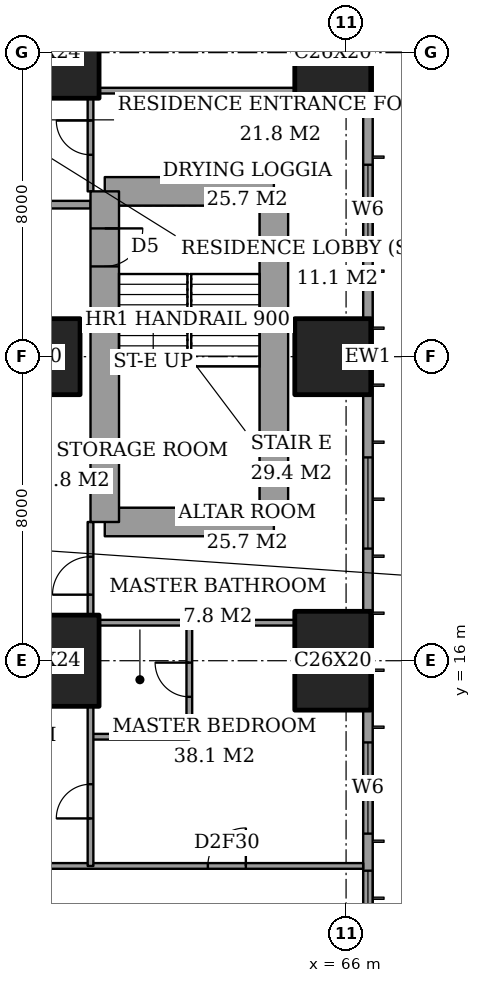
"""IFC4 building model, lengths in metres.
Left out: names, types, materials, properties, quantities, classifications, styles, units other than length and angle.
Written with IfcOpenShell. Run it as: python <this file> out.ifc"""

import sys

from ifc_helpers import new_model, si_unit, direction, frame, frame_2d, origin, origin_2d, place, context, subcontext, project, spatial, rectangle, extrude, element, fill, save


model = new_model("IFC4")
c1 = context("Model", 3, precision=1e-05, world=origin(), true_north=direction((0.0, 1.0)))
c2 = subcontext(c1, "Body", "Model", "MODEL_VIEW")
j1 = project(units=[si_unit("LENGTHUNIT", "METRE"), si_unit("PLANEANGLEUNIT", "RADIAN")], contexts=[c1])
p1 = place(None, origin())
s1 = spatial("IfcSite", under=j1, at=p1, CompositionType="ELEMENT")
p2 = place(p1, origin())
s2 = spatial("IfcBuilding", under=s1, at=p2, CompositionType="ELEMENT")
p3 = place(p2, frame((0.0, 0.0, 58.4)))
s3 = spatial("IfcBuildingStorey", under=s2, at=p3, CompositionType="ELEMENT", Elevation=58.4)
p4 = place(p3, frame((58.0, 16.0, 0.0), z_axis=(0.0, 0.0, 1.0), x_axis=(1.0, 0.0, 0.0)))
e1 = element("IfcColumn", 1, at=p4, inside=s3, PredefinedType="COLUMN", context=c2, shape_type="SweptSolid", body=[
    extrude(rectangle(XDim=3.0, YDim=2.4, at=origin_2d()), origin(), (0.0, 0.0, 1.0), 3.6),
])
p5 = place(p3, frame((58.0, 24.0, 0.0), z_axis=(0.0, 0.0, 1.0), x_axis=(1.0, 0.0, 0.0)))
e2 = element("IfcColumn", 2, at=p5, inside=s3, PredefinedType="COLUMN", context=c2, shape_type="SweptSolid", body=[
    extrude(rectangle(XDim=2.0, YDim=2.0, at=origin_2d()), origin(), (0.0, 0.0, 1.0), 3.6),
])
p6 = place(p3, frame((58.0, 32.0, 0.0), z_axis=(0.0, 0.0, 1.0), x_axis=(1.0, 0.0, 0.0)))
e3 = element("IfcColumn", 3, at=p6, inside=s3, PredefinedType="COLUMN", context=c2, shape_type="SweptSolid", body=[
    extrude(rectangle(XDim=3.0, YDim=2.4, at=origin_2d()), origin(), (0.0, 0.0, 1.0), 3.6),
])
p7 = place(p3, frame((65.65, 16.0, 0.0), z_axis=(0.0, 0.0, 1.0), x_axis=(0.0, 1.0, 0.0)))
e4 = element("IfcColumn", 4, at=p7, inside=s3, PredefinedType="COLUMN", context=c2, shape_type="SweptSolid", body=[
    extrude(rectangle(XDim=2.6, YDim=2.0, at=origin_2d()), origin(), (0.0, 0.0, 1.0), 3.6),
])
p8 = place(p3, frame((65.65, 24.0, 0.0), z_axis=(0.0, 0.0, 1.0), x_axis=(1.0, 0.0, 0.0)))
e5 = element("IfcColumn", 5, at=p8, inside=s3, PredefinedType="COLUMN", context=c2, shape_type="SweptSolid", body=[
    extrude(rectangle(XDim=2.0, YDim=2.0, at=origin_2d()), origin(), (0.0, 0.0, 1.0), 3.6),
])
p9 = place(p3, frame((65.65, 32.0, 0.0), z_axis=(0.0, 0.0, 1.0), x_axis=(0.0, 1.0, 0.0)))
e6 = element("IfcColumn", 6, at=p9, inside=s3, PredefinedType="COLUMN", context=c2, shape_type="SweptSolid", body=[
    extrude(rectangle(XDim=2.6, YDim=2.0, at=origin_2d()), origin(), (0.0, 0.0, 1.0), 3.6),
])
p10 = place(p3, frame((59.65, 19.65, 0.0), z_axis=(0.0, 0.0, 1.0), x_axis=(1.0, 0.0, 0.0)))
e7 = element("IfcWall", 7, at=p10, inside=s3, PredefinedType="SHEAR", context=c2, shape_type="SweptSolid", body=[
    extrude(rectangle(XDim=4.45, YDim=0.75, at=frame_2d((2.225, 0.0))), origin(), (0.0, 0.0, 1.0), 3.6),
])
p11 = place(p3, frame((64.1, 19.65, 0.0), z_axis=(0.0, 0.0, 1.0), x_axis=(0.0, 1.0, 0.0)))
e8 = element("IfcWall", 8, at=p11, inside=s3, PredefinedType="SHEAR", context=c2, shape_type="SweptSolid", body=[
    extrude(rectangle(XDim=8.7, YDim=0.75, at=frame_2d((4.35, 0.0))), origin(), (0.0, 0.0, 1.0), 3.6),
])
p12 = place(p3, frame((64.1, 28.35, 0.0), z_axis=(0.0, 0.0, 1.0), x_axis=(-1.0, 0.0, 0.0)))
e9 = element("IfcWall", 9, at=p12, inside=s3, PredefinedType="SHEAR", context=c2, shape_type="SweptSolid", body=[
    extrude(rectangle(XDim=4.45, YDim=0.75, at=frame_2d((2.225, 0.0))), origin(), (0.0, 0.0, 1.0), 3.6),
])
p13 = place(p3, frame((59.65, 28.35, 0.0), z_axis=(0.0, 0.0, 1.0), x_axis=(0.0, -1.0, 0.0)))
e10 = element("IfcWall", 10, at=p13, inside=s3, PredefinedType="SHEAR", context=c2, shape_type="SweptSolid", body=[
    extrude(rectangle(XDim=8.7, YDim=0.75, at=frame_2d((4.35, 0.0))), origin(), (0.0, 0.0, 1.0), 3.6),
])
p14 = place(p13, frame((0.975, 0.0, 0.0)))
e11 = element("IfcOpeningElement", 11, at=p14, cuts=e10, PredefinedType="OPENING", context=c2, shape_type="SweptSolid", body=[
    extrude(rectangle(XDim=1.0, YDim=2.1, at=frame_2d((0.5, 1.05))), frame((0.0, 0.385, 0.0), z_axis=(0.0, -1.0, 0.0), x_axis=(1.0, 0.0, 0.0)), (0.0, 0.0, 1.0), 0.77),
])
p15 = place(p3, frame((66.575, 3.175, 0.0), z_axis=(0.0, 0.0, 1.0), x_axis=(0.0, 1.0, 0.0)))
e12 = element("IfcWall", 12, at=p15, inside=s3, PredefinedType="SOLIDWALL", context=c2, shape_type="SweptSolid", body=[
    extrude(rectangle(XDim=41.65, YDim=0.25, at=frame_2d((20.825, 0.0))), origin(), (0.0, 0.0, 1.0), 3.6),
])
p16 = place(p15, frame((0.775, 0.0, 0.6)))
e13 = element("IfcOpeningElement", 13, at=p16, cuts=e12, PredefinedType="OPENING", context=c2, shape_type="SweptSolid", body=[
    extrude(rectangle(XDim=2.4, YDim=2.0, at=frame_2d((1.2, 1.0))), frame((0.0, 0.135, 0.0), z_axis=(0.0, -1.0, 0.0), x_axis=(1.0, 0.0, 0.0)), (0.0, 0.0, 1.0), 0.27),
])
p17 = place(p15, frame((6.1, 0.0, 0.6)))
e14 = element("IfcOpeningElement", 14, at=p17, cuts=e12, PredefinedType="OPENING", context=c2, shape_type="SweptSolid", body=[
    extrude(rectangle(XDim=1.2, YDim=2.0, at=frame_2d((0.6, 1.0))), frame((0.0, 0.135, 0.0), z_axis=(0.0, -1.0, 0.0), x_axis=(1.0, 0.0, 0.0)), (0.0, 0.0, 1.0), 0.27),
])
p18 = place(p15, frame((8.275, 0.0, 0.6)))
e15 = element("IfcOpeningElement", 15, at=p18, cuts=e12, PredefinedType="OPENING", context=c2, shape_type="SweptSolid", body=[
    extrude(rectangle(XDim=2.4, YDim=2.0, at=frame_2d((1.2, 1.0))), frame((0.0, 0.135, 0.0), z_axis=(0.0, -1.0, 0.0), x_axis=(1.0, 0.0, 0.0)), (0.0, 0.0, 1.0), 0.27),
])
p19 = place(p15, frame((15.775, 0.0, 0.6)))
e16 = element("IfcOpeningElement", 16, at=p19, cuts=e12, PredefinedType="OPENING", context=c2, shape_type="SweptSolid", body=[
    extrude(rectangle(XDim=2.4, YDim=2.0, at=frame_2d((1.2, 1.0))), frame((0.0, 0.135, 0.0), z_axis=(0.0, -1.0, 0.0), x_axis=(1.0, 0.0, 0.0)), (0.0, 0.0, 1.0), 0.27),
])
p20 = place(p15, frame((23.475, 0.0, 0.6)))
e17 = element("IfcOpeningElement", 17, at=p20, cuts=e12, PredefinedType="OPENING", context=c2, shape_type="SweptSolid", body=[
    extrude(rectangle(XDim=2.4, YDim=2.0, at=frame_2d((1.2, 1.0))), frame((0.0, 0.135, 0.0), z_axis=(0.0, -1.0, 0.0), x_axis=(1.0, 0.0, 0.0)), (0.0, 0.0, 1.0), 0.27),
])
p21 = place(p15, frame((30.875, 0.0, 0.6)))
e18 = element("IfcOpeningElement", 18, at=p21, cuts=e12, PredefinedType="OPENING", context=c2, shape_type="SweptSolid", body=[
    extrude(rectangle(XDim=2.4, YDim=2.0, at=frame_2d((1.2, 1.0))), frame((0.0, 0.135, 0.0), z_axis=(0.0, -1.0, 0.0), x_axis=(1.0, 0.0, 0.0)), (0.0, 0.0, 1.0), 0.27),
])
p22 = place(p15, frame((34.325, 0.0, 0.6)))
e19 = element("IfcOpeningElement", 19, at=p22, cuts=e12, PredefinedType="OPENING", context=c2, shape_type="SweptSolid", body=[
    extrude(rectangle(XDim=1.2, YDim=2.0, at=frame_2d((0.6, 1.0))), frame((0.0, 0.135, 0.0), z_axis=(0.0, -1.0, 0.0), x_axis=(1.0, 0.0, 0.0)), (0.0, 0.0, 1.0), 0.27),
])
p23 = place(p15, frame((38.475, 0.0, 0.6)))
e20 = element("IfcOpeningElement", 20, at=p23, cuts=e12, PredefinedType="OPENING", context=c2, shape_type="SweptSolid", body=[
    extrude(rectangle(XDim=2.4, YDim=2.0, at=frame_2d((1.2, 1.0))), frame((0.0, 0.135, 0.0), z_axis=(0.0, -1.0, 0.0), x_axis=(1.0, 0.0, 0.0)), (0.0, 0.0, 1.0), 0.27),
])
p24 = place(p3, frame((41.439, 10.6, 0.0), z_axis=(0.0, 0.0, 1.0), x_axis=(1.0, 0.0, 0.0)))
e21 = element("IfcWall", 21, at=p24, inside=s3, PredefinedType="PARTITIONING", context=c2, shape_type="SweptSolid", body=[
    extrude(rectangle(XDim=25.011, YDim=0.15, at=frame_2d((12.505, 0.0))), origin(), (0.0, 0.0, 1.0), 3.35),
])
p25 = place(p24, frame((11.961, 0.0, 0.0)))
e22 = element("IfcOpeningElement", 22, at=p25, cuts=e21, PredefinedType="OPENING", context=c2, shape_type="SweptSolid", body=[
    extrude(rectangle(XDim=1.0, YDim=2.1, at=frame_2d((0.5, 1.05))), frame((0.0, 0.085, 0.0), z_axis=(0.0, -1.0, 0.0), x_axis=(1.0, 0.0, 0.0)), (0.0, 0.0, 1.0), 0.17),
])
p26 = place(p24, frame((20.924, 0.0, 0.0)))
e23 = element("IfcOpeningElement", 23, at=p26, cuts=e21, PredefinedType="OPENING", context=c2, shape_type="SweptSolid", body=[
    extrude(rectangle(XDim=1.0, YDim=2.1, at=frame_2d((0.5, 1.05))), frame((0.0, 0.085, 0.0), z_axis=(0.0, -1.0, 0.0), x_axis=(1.0, 0.0, 0.0)), (0.0, 0.0, 1.0), 0.17),
])
p27 = place(p24, frame((9.561, 0.0, 0.0)))
e24 = element("IfcOpeningElement", 24, at=p27, cuts=e21, PredefinedType="OPENING", context=c2, shape_type="SweptSolid", body=[
    extrude(rectangle(XDim=1.0, YDim=2.1, at=frame_2d((0.5, 1.05))), frame((0.0, 0.085, 0.0), z_axis=(0.0, -1.0, 0.0), x_axis=(1.0, 0.0, 0.0)), (0.0, 0.0, 1.0), 0.17),
])
p28 = place(p24, frame((7.161, 0.0, 0.0)))
e25 = element("IfcOpeningElement", 25, at=p28, cuts=e21, PredefinedType="OPENING", context=c2, shape_type="SweptSolid", body=[
    extrude(rectangle(XDim=1.0, YDim=2.1, at=frame_2d((0.5, 1.05))), frame((0.0, 0.085, 0.0), z_axis=(0.0, -1.0, 0.0), x_axis=(1.0, 0.0, 0.0)), (0.0, 0.0, 1.0), 0.17),
])
p29 = place(p24, frame((2.836, 0.0, 0.0)))
e26 = element("IfcOpeningElement", 26, at=p29, cuts=e21, PredefinedType="OPENING", context=c2, shape_type="SweptSolid", body=[
    extrude(rectangle(XDim=1.0, YDim=2.1, at=frame_2d((0.5, 1.05))), frame((0.0, 0.085, 0.0), z_axis=(0.0, -1.0, 0.0), x_axis=(1.0, 0.0, 0.0)), (0.0, 0.0, 1.0), 0.17),
])
p30 = place(p3, frame((59.275, 14.0, 0.0), z_axis=(0.0, 0.0, 1.0), x_axis=(1.0, 0.0, 0.0)))
e27 = element("IfcWall", 27, at=p30, inside=s3, PredefinedType="PARTITIONING", context=c2, shape_type="SweptSolid", body=[
    extrude(rectangle(XDim=2.6, YDim=0.15, at=frame_2d((1.3, 0.0))), origin(), (0.0, 0.0, 1.0), 3.35),
])
p31 = place(p3, frame((59.5, 17.0, 0.0), z_axis=(0.0, 0.0, 1.0), x_axis=(1.0, 0.0, 0.0)))
e28 = element("IfcWall", 28, at=p31, inside=s3, PredefinedType="PARTITIONING", context=c2, shape_type="SweptSolid", body=[
    extrude(rectangle(XDim=5.15, YDim=0.15, at=frame_2d((2.575, 0.0))), origin(), (0.0, 0.0, 1.0), 3.35),
])
p32 = place(p3, frame((42.0, 28.0, 0.0), z_axis=(0.0, 0.0, 1.0), x_axis=(1.0, 0.0, 0.0)))
e29 = element("IfcWall", 29, at=p32, inside=s3, PredefinedType="PARTITIONING", context=c2, shape_type="SweptSolid", body=[
    extrude(rectangle(XDim=17.275, YDim=0.2, at=frame_2d((8.637, 0.0))), origin(), (0.0, 0.0, 1.0), 3.35),
])
p33 = place(p32, frame((9.1, 0.0, 0.0)))
e30 = element("IfcOpeningElement", 30, at=p33, cuts=e29, PredefinedType="OPENING", context=c2, shape_type="SweptSolid", body=[
    extrude(rectangle(XDim=1.2, YDim=2.4, at=frame_2d((0.6, 1.2))), frame((0.0, 0.11, 0.0), z_axis=(0.0, -1.0, 0.0), x_axis=(1.0, 0.0, 0.0)), (0.0, 0.0, 1.0), 0.22),
])
p34 = place(p3, frame((59.5, 31.0, 0.0), z_axis=(0.0, 0.0, 1.0), x_axis=(1.0, 0.0, 0.0)))
e31 = element("IfcWall", 31, at=p34, inside=s3, PredefinedType="PARTITIONING", context=c2, shape_type="SweptSolid", body=[
    extrude(rectangle(XDim=5.15, YDim=0.15, at=frame_2d((2.575, 0.0))), origin(), (0.0, 0.0, 1.0), 3.35),
])
p35 = place(p3, frame((59.275, 10.6, 0.0), z_axis=(0.0, 0.0, 1.0), x_axis=(0.0, 1.0, 0.0)))
e32 = element("IfcWall", 32, at=p35, inside=s3, PredefinedType="PARTITIONING", context=c2, shape_type="SweptSolid", body=[
    extrude(rectangle(XDim=4.2, YDim=0.15, at=frame_2d((2.1, 0.0))), origin(), (0.0, 0.0, 1.0), 3.35),
])
p36 = place(p35, frame((1.25, 0.0, 0.0)))
e33 = element("IfcOpeningElement", 33, at=p36, cuts=e32, PredefinedType="OPENING", context=c2, shape_type="SweptSolid", body=[
    extrude(rectangle(XDim=0.9, YDim=2.1, at=frame_2d((0.45, 1.05))), frame((0.0, 0.085, 0.0), z_axis=(0.0, -1.0, 0.0), x_axis=(1.0, 0.0, 0.0)), (0.0, 0.0, 1.0), 0.17),
])
p37 = place(p3, frame((59.275, 17.2, 0.0), z_axis=(0.0, 0.0, 1.0), x_axis=(0.0, 1.0, 0.0)))
e34 = element("IfcWall", 34, at=p37, inside=s3, PredefinedType="PARTITIONING", context=c2, shape_type="SweptSolid", body=[
    extrude(rectangle(XDim=2.45, YDim=0.15, at=frame_2d((1.225, 0.0))), origin(), (0.0, 0.0, 1.0), 3.35),
])
p38 = place(p37, frame((0.538, 0.0, 0.0)))
e35 = element("IfcOpeningElement", 35, at=p38, cuts=e34, PredefinedType="OPENING", context=c2, shape_type="SweptSolid", body=[
    extrude(rectangle(XDim=1.0, YDim=2.1, at=frame_2d((0.5, 1.05))), frame((0.0, 0.085, 0.0), z_axis=(0.0, -1.0, 0.0), x_axis=(1.0, 0.0, 0.0)), (0.0, 0.0, 1.0), 0.17),
])
p39 = place(p3, frame((59.275, 28.35, 0.0), z_axis=(0.0, 0.0, 1.0), x_axis=(0.0, 1.0, 0.0)))
e36 = element("IfcWall", 36, at=p39, inside=s3, PredefinedType="PARTITIONING", context=c2, shape_type="SweptSolid", body=[
    extrude(rectangle(XDim=2.45, YDim=0.15, at=frame_2d((1.225, 0.0))), origin(), (0.0, 0.0, 1.0), 3.35),
])
p40 = place(p39, frame((0.962, 0.0, 0.0)))
e37 = element("IfcOpeningElement", 37, at=p40, cuts=e36, PredefinedType="OPENING", context=c2, shape_type="SweptSolid", body=[
    extrude(rectangle(XDim=0.9, YDim=2.1, at=frame_2d((0.45, 1.05))), frame((0.0, 0.085, 0.0), z_axis=(0.0, -1.0, 0.0), x_axis=(1.0, 0.0, 0.0)), (0.0, 0.0, 1.0), 0.17),
])
p41 = place(p3, frame((61.875, 14.0, 0.0), z_axis=(0.0, 0.0, 1.0), x_axis=(0.0, 1.0, 0.0)))
e38 = element("IfcWall", 38, at=p41, inside=s3, PredefinedType="PARTITIONING", context=c2, shape_type="SweptSolid", body=[
    extrude(rectangle(XDim=3.0, YDim=0.15, at=frame_2d((1.5, 0.0))), origin(), (0.0, 0.0, 1.0), 3.35),
])
p42 = place(p41, frame((1.05, 0.0, 0.0)))
e39 = element("IfcOpeningElement", 39, at=p42, cuts=e38, PredefinedType="OPENING", context=c2, shape_type="SweptSolid", body=[
    extrude(rectangle(XDim=0.9, YDim=2.1, at=frame_2d((0.45, 1.05))), frame((0.0, 0.085, 0.0), z_axis=(0.0, -1.0, 0.0), x_axis=(1.0, 0.0, 0.0)), (0.0, 0.0, 1.0), 0.17),
])
p43 = place(p17, origin())
e40 = element("IfcWindow", 40, at=p43, inside=s3, PartitioningType="SINGLE_PANEL", PredefinedType="WINDOW", context=c2, shape_type="SweptSolid", body=[
    extrude(rectangle(XDim=1.2, YDim=2.0, at=frame_2d((0.6, 1.0))), frame((0.0, 0.03, 0.0), z_axis=(0.0, -1.0, 0.0), x_axis=(1.0, 0.0, 0.0)), (0.0, 0.0, 1.0), 0.06),
])
fill(e14, e40)
p44 = place(p18, origin())
e41 = element("IfcWindow", 41, at=p44, inside=s3, PartitioningType="SINGLE_PANEL", PredefinedType="WINDOW", context=c2, shape_type="SweptSolid", body=[
    extrude(rectangle(XDim=2.4, YDim=2.0, at=frame_2d((1.2, 1.0))), frame((0.0, 0.03, 0.0), z_axis=(0.0, -1.0, 0.0), x_axis=(1.0, 0.0, 0.0)), (0.0, 0.0, 1.0), 0.06),
])
fill(e15, e41)
p45 = place(p19, origin())
e42 = element("IfcWindow", 42, at=p45, inside=s3, PartitioningType="SINGLE_PANEL", PredefinedType="WINDOW", context=c2, shape_type="SweptSolid", body=[
    extrude(rectangle(XDim=2.4, YDim=2.0, at=frame_2d((1.2, 1.0))), frame((0.0, 0.03, 0.0), z_axis=(0.0, -1.0, 0.0), x_axis=(1.0, 0.0, 0.0)), (0.0, 0.0, 1.0), 0.06),
])
fill(e16, e42)
p46 = place(p20, origin())
e43 = element("IfcWindow", 43, at=p46, inside=s3, PartitioningType="SINGLE_PANEL", PredefinedType="WINDOW", context=c2, shape_type="SweptSolid", body=[
    extrude(rectangle(XDim=2.4, YDim=2.0, at=frame_2d((1.2, 1.0))), frame((0.0, 0.03, 0.0), z_axis=(0.0, -1.0, 0.0), x_axis=(1.0, 0.0, 0.0)), (0.0, 0.0, 1.0), 0.06),
])
fill(e17, e43)
p47 = place(p42, origin())
e44 = element("IfcDoor", 44, at=p47, inside=s3, OperationType="SINGLE_SWING_LEFT", PredefinedType="DOOR", context=c2, shape_type="SweptSolid", body=[
    extrude(rectangle(XDim=0.9, YDim=2.1, at=frame_2d((0.45, 1.05))), frame((0.0, 0.025, 0.0), z_axis=(0.0, -1.0, 0.0), x_axis=(1.0, 0.0, 0.0)), (0.0, 0.0, 1.0), 0.05),
])
fill(e39, e44)
p48 = place(p26, origin())
e45 = element("IfcDoor", 45, at=p48, inside=s3, OperationType="SINGLE_SWING_LEFT", PredefinedType="DOOR", context=c2, shape_type="SweptSolid", body=[
    extrude(rectangle(XDim=1.0, YDim=2.1, at=frame_2d((0.5, 1.05))), frame((0.0, 0.025, 0.0), z_axis=(0.0, -1.0, 0.0), x_axis=(1.0, 0.0, 0.0)), (0.0, 0.0, 1.0), 0.05),
])
fill(e23, e45)
p49 = place(p38, origin())
e46 = element("IfcDoor", 46, at=p49, inside=s3, OperationType="SINGLE_SWING_RIGHT", PredefinedType="DOOR", context=c2, shape_type="SweptSolid", body=[
    extrude(rectangle(XDim=1.0, YDim=2.1, at=frame_2d((0.5, 1.05))), frame((0.0, 0.025, 0.0), z_axis=(0.0, -1.0, 0.0), x_axis=(1.0, 0.0, 0.0)), (0.0, 0.0, 1.0), 0.05),
])
fill(e35, e46)
p50 = place(p36, origin())
e47 = element("IfcDoor", 47, at=p50, inside=s3, OperationType="SINGLE_SWING_RIGHT", PredefinedType="DOOR", context=c2, shape_type="SweptSolid", body=[
    extrude(rectangle(XDim=0.9, YDim=2.1, at=frame_2d((0.45, 1.05))), frame((0.0, 0.025, 0.0), z_axis=(0.0, -1.0, 0.0), x_axis=(1.0, 0.0, 0.0)), (0.0, 0.0, 1.0), 0.05),
])
fill(e33, e47)
p51 = place(p40, origin())
e48 = element("IfcDoor", 48, at=p51, inside=s3, OperationType="SINGLE_SWING_LEFT", PredefinedType="DOOR", context=c2, shape_type="SweptSolid", body=[
    extrude(rectangle(XDim=0.9, YDim=2.1, at=frame_2d((0.45, 1.05))), frame((0.0, 0.025, 0.0), z_axis=(0.0, -1.0, 0.0), x_axis=(1.0, 0.0, 0.0)), (0.0, 0.0, 1.0), 0.05),
])
fill(e37, e48)
p52 = place(p14, origin())
e49 = element("IfcDoor", 49, at=p52, inside=s3, OperationType="SINGLE_SWING_RIGHT", PredefinedType="DOOR", context=c2, shape_type="SweptSolid", body=[
    extrude(rectangle(XDim=1.0, YDim=2.1, at=frame_2d((0.5, 1.05))), frame((0.0, 0.025, 0.0), z_axis=(0.0, -1.0, 0.0), x_axis=(1.0, 0.0, 0.0)), (0.0, 0.0, 1.0), 0.05),
])
fill(e11, e49)
save(model, sys.argv[1])
